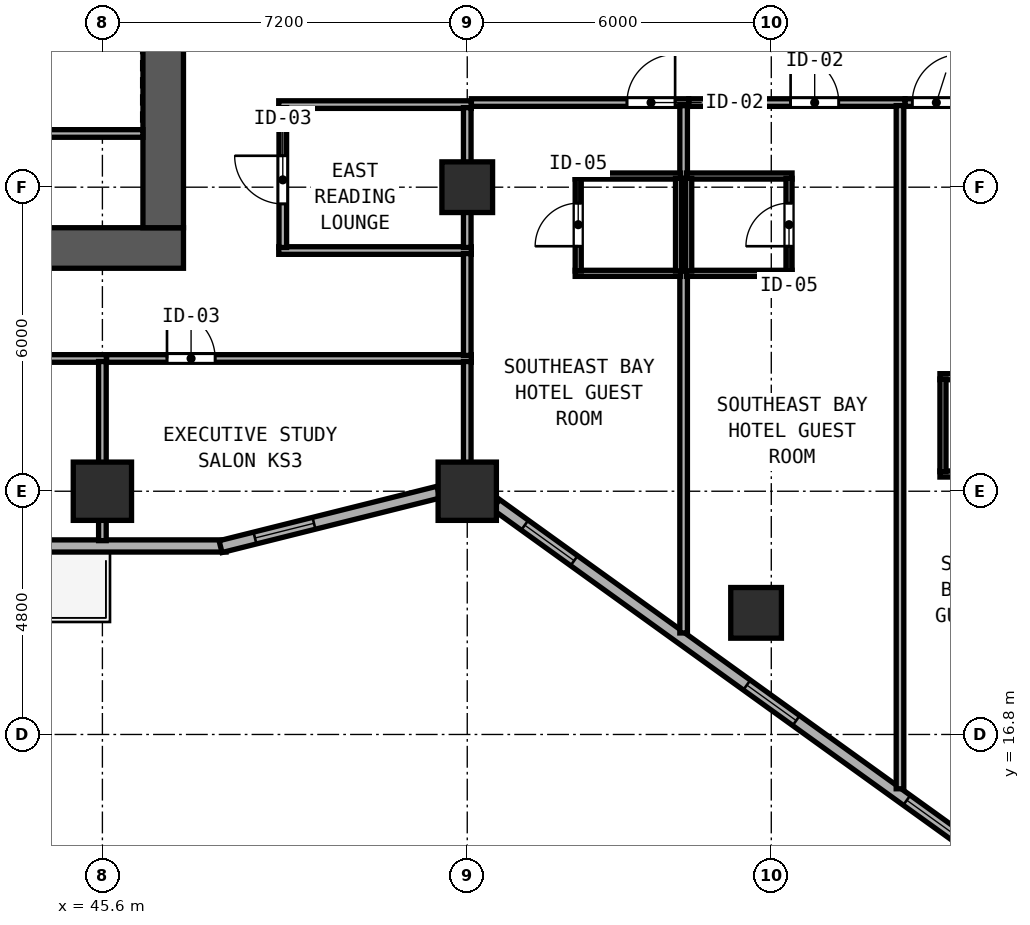
"""IFC4 building model, lengths in metres.
Left out: names, types, materials, properties, quantities, classifications, styles, units other than length and angle.
Written with IfcOpenShell. Run it as: python <this file> out.ifc"""

import sys

from ifc_helpers import new_model, si_unit, direction, frame, frame_2d, origin, origin_2d, place, context, subcontext, project, spatial, rectangle, hollow_rectangle, extrude, element, fill, save


model = new_model("IFC4")
c1 = context("Model", 3, precision=1e-05, world=origin(), true_north=direction((0.0, 1.0)))
c2 = subcontext(c1, "Body", "Model", "MODEL_VIEW")
j1 = project(units=[si_unit("LENGTHUNIT", "METRE"), si_unit("PLANEANGLEUNIT", "RADIAN")], contexts=[c1])
p1 = place(None, origin())
s1 = spatial("IfcSite", under=j1, at=p1, CompositionType="ELEMENT")
p2 = place(p1, origin())
s2 = spatial("IfcBuilding", under=s1, at=p2, CompositionType="ELEMENT")
p3 = place(p2, frame((0.0, 0.0, 59.0)))
s3 = spatial("IfcBuildingStorey", under=s2, at=p3, CompositionType="ELEMENT", Elevation=59.0)
p4 = place(p3, frame((29.6, 26.4, 0.0), z_axis=(0.0, 0.0, 1.0), x_axis=(1.0, 0.0, 0.0)))
e1 = element("IfcWall", 1, at=p4, inside=s3, PredefinedType="SHEAR", context=c2, shape_type="SweptSolid", body=[
    extrude(rectangle(XDim=17.6, YDim=0.8, at=frame_2d((8.8, 0.0))), origin(), (0.0, 0.0, 1.0), 3.6),
])
p5 = place(p4, frame((2.47, 0.0, 0.0), z_axis=(0.0, 0.0, 1.0), x_axis=(-1.0, 0.0, 0.0)))
e2 = element("IfcOpeningElement", 2, at=p5, cuts=e1, PredefinedType="OPENING", context=c2, shape_type="SweptSolid", body=[
    extrude(rectangle(XDim=0.9, YDim=2.1, at=frame_2d((0.45, 1.05))), frame((0.0, 0.41, 0.0), z_axis=(0.0, -1.0, 0.0), x_axis=(1.0, 0.0, 0.0)), (0.0, 0.0, 1.0), 0.82),
])
p6 = place(p4, frame((6.36, 0.0, 0.0), z_axis=(0.0, 0.0, 1.0), x_axis=(-1.0, 0.0, 0.0)))
e3 = element("IfcOpeningElement", 3, at=p6, cuts=e1, PredefinedType="OPENING", context=c2, shape_type="SweptSolid", body=[
    extrude(rectangle(XDim=0.9, YDim=2.1, at=frame_2d((0.45, 1.05))), frame((0.0, 0.41, 0.0), z_axis=(0.0, -1.0, 0.0), x_axis=(1.0, 0.0, 0.0)), (0.0, 0.0, 1.0), 0.82),
])
p7 = place(p3, frame((46.8, 26.8, 0.0), z_axis=(0.0, 0.0, 1.0), x_axis=(0.0, 1.0, 0.0)))
e4 = element("IfcWall", 4, at=p7, inside=s3, PredefinedType="SHEAR", context=c2, shape_type="SweptSolid", body=[
    extrude(rectangle(XDim=4.05, YDim=0.8, at=frame_2d((2.025, 0.0))), origin(), (0.0, 0.0, 1.0), 3.6),
])
for number, where, z_axis, x_axis in (
    (5, (52.8, 21.6, 0.0), (0.0, 0.0, 1.0), (1.0, 0.0, 0.0)),
    (6, (45.6, 21.6, 0.0), (0.0, 0.0, 1.0), (1.0, 0.0, 0.0)),
):
    element("IfcColumn", number, at=place(p3, frame(where, z_axis=z_axis, x_axis=x_axis)), inside=s3, PredefinedType="COLUMN", context=c2, shape_type="SweptSolid", body=[
        extrude(hollow_rectangle(XDim=1.15, YDim=1.15, WallThickness=0.042, at=origin_2d()), origin(), (0.0, 0.0, 1.0), 3.8),
    ])
for number, where, z_axis, x_axis in (
    (7, (52.8, 27.6, 0.0), (0.0, 0.0, 1.0), (1.0, 0.0, 0.0)),
    (8, (58.5, 19.2, 0.0), (0.0, 0.0, 1.0), (1.0, 0.0, 0.0)),
):
    element("IfcColumn", number, at=place(p3, frame(where, z_axis=z_axis, x_axis=x_axis)), inside=s3, PredefinedType="COLUMN", context=c2, shape_type="SweptSolid", body=[
        extrude(hollow_rectangle(XDim=1.0, YDim=1.0, WallThickness=0.038, at=origin_2d()), origin(), (0.0, 0.0, 1.0), 3.8),
    ])
p8 = place(p3, frame((28.76, 20.52, 0.0), z_axis=(0.0, 0.0, 1.0), x_axis=(1.0, 0.0, 0.0)))
e9 = element("IfcWall", 9, at=p8, inside=s3, PredefinedType="SOLIDWALL", context=c2, shape_type="SweptSolid", body=[
    extrude(rectangle(XDim=19.281, YDim=0.24, at=frame_2d((9.64, 0.0))), origin(), (0.0, 0.0, 1.0), 3.6),
])
p9 = place(p8, frame((15.64, 0.0, 0.0), z_axis=(0.0, 0.0, 1.0), x_axis=(-1.0, 0.0, 0.0)))
e10 = element("IfcOpeningElement", 10, at=p9, cuts=e9, PredefinedType="OPENING", context=c2, shape_type="SweptSolid", body=[
    extrude(rectangle(XDim=1.2, YDim=2.15, at=frame_2d((0.6, 1.075))), frame((0.0, 0.13, 0.0), z_axis=(0.0, -1.0, 0.0), x_axis=(1.0, 0.0, 0.0)), (0.0, 0.0, 1.0), 0.26),
])
p10 = place(p3, frame((47.932, 20.507, 0.0), z_axis=(0.0, 0.0, 1.0), x_axis=(0.970145739396, 0.242522667667, 0.0)))
e11 = element("IfcWall", 11, at=p10, inside=s3, PredefinedType="SOLIDWALL", context=c2, shape_type="SweptSolid", body=[
    extrude(rectangle(XDim=4.433, YDim=0.24, at=frame_2d((2.217, 0.0))), origin(), (0.0, 0.0, 1.0), 3.097),
])
p11 = place(p10, frame((0.7, 0.0, 0.85)))
e12 = element("IfcOpeningElement", 12, at=p11, cuts=e11, PredefinedType="OPENING", context=c2, shape_type="SweptSolid", body=[
    extrude(rectangle(XDim=1.2, YDim=1.85, at=frame_2d((0.6, 0.925))), frame((0.0, 0.13, 0.0), z_axis=(0.0, -1.0, 0.0), x_axis=(1.0, 0.0, 0.0)), (0.0, 0.0, 1.0), 0.26),
])
p12 = place(p3, frame((53.367, 21.34, 0.0), z_axis=(0.0, 0.0, 1.0), x_axis=(0.811543176492, -0.58429245476, 0.0)))
e13 = element("IfcWall", 13, at=p12, inside=s3, PredefinedType="SOLIDWALL", context=c2, shape_type="SweptSolid", body=[
    extrude(rectangle(XDim=11.531, YDim=0.24, at=frame_2d((5.765, 0.0))), origin(), (0.0, 0.0, 1.0), 3.097),
])
p13 = place(p12, frame((0.7, 0.0, 0.85)))
e14 = element("IfcOpeningElement", 14, at=p13, cuts=e13, PredefinedType="OPENING", context=c2, shape_type="SweptSolid", body=[
    extrude(rectangle(XDim=1.2, YDim=1.85, at=frame_2d((0.6, 0.925))), frame((0.0, 0.13, 0.0), z_axis=(0.0, -1.0, 0.0), x_axis=(1.0, 0.0, 0.0)), (0.0, 0.0, 1.0), 0.26),
])
p14 = place(p12, frame((6.1, 0.0, 0.85)))
e15 = element("IfcOpeningElement", 15, at=p14, cuts=e13, PredefinedType="OPENING", context=c2, shape_type="SweptSolid", body=[
    extrude(rectangle(XDim=1.2, YDim=1.85, at=frame_2d((0.6, 0.925))), frame((0.0, 0.13, 0.0), z_axis=(0.0, -1.0, 0.0), x_axis=(1.0, 0.0, 0.0)), (0.0, 0.0, 1.0), 0.26),
])
p15 = place(p12, frame((9.99, 0.0, 0.85)))
e16 = element("IfcOpeningElement", 16, at=p15, cuts=e13, PredefinedType="OPENING", context=c2, shape_type="SweptSolid", body=[
    extrude(rectangle(XDim=1.2, YDim=1.85, at=frame_2d((0.6, 0.925))), frame((0.0, 0.13, 0.0), z_axis=(0.0, -1.0, 0.0), x_axis=(1.0, 0.0, 0.0)), (0.0, 0.0, 1.0), 0.26),
])
p16 = place(p3, frame((30.4, 28.66, 0.0), z_axis=(0.0, 0.0, 1.0), x_axis=(1.0, 0.0, 0.0)))
e17 = element("IfcWall", 17, at=p16, inside=s3, PredefinedType="PARTITIONING", context=c2, shape_type="SweptSolid", body=[
    extrude(rectangle(XDim=16.0, YDim=0.15, at=frame_2d((8.0, 0.0))), origin(), (0.0, 0.0, 1.0), 3.6),
])
for number, where, z_axis, x_axis in (
    (18, (49.08, 29.23, 0.0), (0.0, 0.0, 1.0), (1.0, 0.0, 0.0)),
    (19, (49.08, 26.35, 0.0), (0.0, 0.0, 1.0), (1.0, 0.0, 0.0)),
):
    element("IfcWall", number, at=place(p3, frame(where, z_axis=z_axis, x_axis=x_axis)), inside=s3, PredefinedType="PARTITIONING", context=c2, shape_type="SweptSolid", body=[
        extrude(rectangle(XDim=3.8, YDim=0.15, at=frame_2d((1.9, 0.0))), origin(), (0.0, 0.0, 1.0), 3.6),
    ])
p17 = place(p3, frame((49.16, 26.41, 0.0), z_axis=(0.0, 0.0, 1.0), x_axis=(0.0, 1.0, 0.0)))
e20 = element("IfcWall", 20, at=p17, inside=s3, PredefinedType="PARTITIONING", context=c2, shape_type="SweptSolid", body=[
    extrude(rectangle(XDim=2.76, YDim=0.15, at=frame_2d((1.38, 0.0))), origin(), (0.0, 0.0, 1.0), 3.6),
])
p18 = place(p17, frame((0.86, 0.0, 0.0)))
e21 = element("IfcOpeningElement", 21, at=p18, cuts=e20, PredefinedType="OPENING", context=c2, shape_type="SweptSolid", body=[
    extrude(rectangle(XDim=0.95, YDim=2.12, at=frame_2d((0.475, 1.06))), frame((0.0, 0.085, 0.0), z_axis=(0.0, -1.0, 0.0), x_axis=(1.0, 0.0, 0.0)), (0.0, 0.0, 1.0), 0.17),
])
p19 = place(p3, frame((52.8, 26.41, 0.0), z_axis=(0.0, 0.0, 1.0), x_axis=(0.0, 1.0, 0.0)))
e22 = element("IfcWall", 22, at=p19, inside=s3, PredefinedType="PARTITIONING", context=c2, shape_type="SweptSolid", body=[
    extrude(rectangle(XDim=2.76, YDim=0.15, at=frame_2d((1.38, 0.0))), origin(), (0.0, 0.0, 1.0), 3.097),
])
p20 = place(p3, frame((38.482, 24.22, 0.0), z_axis=(0.0, 0.0, 1.0), x_axis=(1.0, 0.0, 0.0)))
e23 = element("IfcWall", 23, at=p20, inside=s3, PredefinedType="PARTITIONING", context=c2, shape_type="SweptSolid", body=[
    extrude(rectangle(XDim=7.198, YDim=0.15, at=frame_2d((3.599, 0.0))), origin(), (0.0, 0.0, 1.0), 3.6),
])
p21 = place(p20, frame((3.913, 0.0, 0.0), z_axis=(0.0, 0.0, 1.0), x_axis=(-1.0, 0.0, 0.0)))
e24 = element("IfcOpeningElement", 24, at=p21, cuts=e23, PredefinedType="OPENING", context=c2, shape_type="SweptSolid", body=[
    extrude(rectangle(XDim=0.95, YDim=2.12, at=frame_2d((0.475, 1.06))), frame((0.0, 0.085, 0.0), z_axis=(0.0, -1.0, 0.0), x_axis=(1.0, 0.0, 0.0)), (0.0, 0.0, 1.0), 0.17),
])
p22 = place(p3, frame((45.6, 20.625, 0.0), z_axis=(0.0, 0.0, 1.0), x_axis=(0.0, 1.0, 0.0)))
e25 = element("IfcWall", 25, at=p22, inside=s3, PredefinedType="PARTITIONING", context=c2, shape_type="SweptSolid", body=[
    extrude(rectangle(XDim=3.535, YDim=0.15, at=frame_2d((1.768, 0.0))), origin(), (0.0, 0.0, 1.0), 2.985),
])
p23 = place(p3, frame((45.682, 24.22, 0.0), z_axis=(0.0, 0.0, 1.0), x_axis=(1.0, 0.0, 0.0)))
e26 = element("IfcWall", 26, at=p23, inside=s3, PredefinedType="PARTITIONING", context=c2, shape_type="SweptSolid", body=[
    extrude(rectangle(XDim=7.198, YDim=0.15, at=frame_2d((3.599, 0.0))), origin(), (0.0, 0.0, 1.0), 3.6),
])
p24 = place(p23, frame((2.143, 0.0, 0.0), z_axis=(0.0, 0.0, 1.0), x_axis=(-1.0, 0.0, 0.0)))
e27 = element("IfcOpeningElement", 27, at=p24, cuts=e26, PredefinedType="OPENING", context=c2, shape_type="SweptSolid", body=[
    extrude(rectangle(XDim=0.95, YDim=2.12, at=frame_2d((0.475, 1.06))), frame((0.0, 0.085, 0.0), z_axis=(0.0, -1.0, 0.0), x_axis=(1.0, 0.0, 0.0)), (0.0, 0.0, 1.0), 0.17),
])
p25 = place(p3, frame((52.8, 21.819, 0.0), z_axis=(0.0, 0.0, 1.0), x_axis=(0.0, 1.0, 0.0)))
e28 = element("IfcWall", 28, at=p25, inside=s3, PredefinedType="PARTITIONING", context=c2, shape_type="SweptSolid", body=[
    extrude(rectangle(XDim=2.341, YDim=0.15, at=frame_2d((1.171, 0.0))), origin(), (0.0, 0.0, 1.0), 3.097),
])
p26 = place(p3, frame((52.882, 29.27, 0.0), z_axis=(0.0, 0.0, 1.0), x_axis=(1.0, 0.0, 0.0)))
e29 = element("IfcWall", 29, at=p26, inside=s3, PredefinedType="PARTITIONING", context=c2, shape_type="SweptSolid", body=[
    extrude(rectangle(XDim=4.288, YDim=0.15, at=frame_2d((2.144, 0.0))), origin(), (0.0, 0.0, 1.0), 3.6),
])
p27 = place(p26, frame((4.02, 0.0, 0.0), z_axis=(0.0, 0.0, 1.0), x_axis=(-1.0, 0.0, 0.0)))
e30 = element("IfcOpeningElement", 30, at=p27, cuts=e29, PredefinedType="OPENING", context=c2, shape_type="SweptSolid", body=[
    extrude(rectangle(XDim=0.95, YDim=2.15, at=frame_2d((0.475, 1.075))), frame((0.0, 0.085, 0.0), z_axis=(0.0, -1.0, 0.0), x_axis=(1.0, 0.0, 0.0)), (0.0, 0.0, 1.0), 0.17),
])
p28 = place(p3, frame((52.8, 24.28, 0.0), z_axis=(0.0, 0.0, 1.0), x_axis=(0.0, 1.0, 0.0)))
e31 = element("IfcWall", 31, at=p28, inside=s3, PredefinedType="PARTITIONING", context=c2, shape_type="SweptSolid", body=[
    extrude(rectangle(XDim=2.01, YDim=0.15, at=frame_2d((1.005, 0.0))), origin(), (0.0, 0.0, 1.0), 3.097),
])
p29 = place(p3, frame((57.07, 18.803, 0.0), z_axis=(0.0, 0.0, 1.0), x_axis=(0.0, 1.0, 0.0)))
e32 = element("IfcWall", 32, at=p29, inside=s3, PredefinedType="PARTITIONING", context=c2, shape_type="SweptSolid", body=[
    extrude(rectangle(XDim=10.407, YDim=0.15, at=frame_2d((5.204, 0.0))), origin(), (0.0, 0.0, 1.0), 3.6),
])
p30 = place(p3, frame((54.93, 27.82, 0.0), z_axis=(0.0, 0.0, 1.0), x_axis=(1.0, 0.0, 0.0)))
e33 = element("IfcWall", 33, at=p30, inside=s3, PredefinedType="PARTITIONING", context=c2, shape_type="SweptSolid", body=[
    extrude(rectangle(XDim=2.08, YDim=0.12, at=frame_2d((1.04, 0.0))), origin(), (0.0, 0.0, 1.0), 3.097),
])
p31 = place(p3, frame((54.93, 25.9, 0.0), z_axis=(0.0, 0.0, 1.0), x_axis=(1.0, 0.0, 0.0)))
e34 = element("IfcWall", 34, at=p31, inside=s3, PredefinedType="PARTITIONING", context=c2, shape_type="SweptSolid", body=[
    extrude(rectangle(XDim=2.08, YDim=0.12, at=frame_2d((1.04, 0.0))), origin(), (0.0, 0.0, 1.0), 3.6),
])
p32 = place(p3, frame((54.99, 25.945, 0.0), z_axis=(0.0, 0.0, 1.0), x_axis=(0.0, 1.0, 0.0)))
e35 = element("IfcWall", 35, at=p32, inside=s3, PredefinedType="PARTITIONING", context=c2, shape_type="SweptSolid", body=[
    extrude(rectangle(XDim=1.83, YDim=0.12, at=frame_2d((0.915, 0.0))), origin(), (0.0, 0.0, 1.0), 3.6),
])
p33 = place(p32, frame((1.34, 0.0, 0.0), z_axis=(0.0, 0.0, 1.0), x_axis=(-1.0, 0.0, 0.0)))
e36 = element("IfcOpeningElement", 36, at=p33, cuts=e35, PredefinedType="OPENING", context=c2, shape_type="SweptSolid", body=[
    extrude(rectangle(XDim=0.85, YDim=2.1, at=frame_2d((0.425, 1.05))), frame((0.0, 0.07, 0.0), z_axis=(0.0, -1.0, 0.0), x_axis=(1.0, 0.0, 0.0)), (0.0, 0.0, 1.0), 0.14),
])
p34 = place(p3, frame((56.97, 25.945, 0.0), z_axis=(0.0, 0.0, 1.0), x_axis=(0.0, 1.0, 0.0)))
e37 = element("IfcWall", 37, at=p34, inside=s3, PredefinedType="PARTITIONING", context=c2, shape_type="SweptSolid", body=[
    extrude(rectangle(XDim=1.83, YDim=0.12, at=frame_2d((0.915, 0.0))), origin(), (0.0, 0.0, 1.0), 3.6),
])
p35 = place(p3, frame((57.172, 29.27, 0.0), z_axis=(0.0, 0.0, 1.0), x_axis=(1.0, 0.0, 0.0)))
e38 = element("IfcWall", 38, at=p35, inside=s3, PredefinedType="PARTITIONING", context=c2, shape_type="SweptSolid", body=[
    extrude(rectangle(XDim=4.268, YDim=0.15, at=frame_2d((2.134, 0.0))), origin(), (0.0, 0.0, 1.0), 3.6),
])
p36 = place(p35, frame((2.959, 0.0, 0.0), z_axis=(0.0, 0.0, 1.0), x_axis=(-1.0, 0.0, 0.0)))
e39 = element("IfcOpeningElement", 39, at=p36, cuts=e38, PredefinedType="OPENING", context=c2, shape_type="SweptSolid", body=[
    extrude(rectangle(XDim=0.95, YDim=2.15, at=frame_2d((0.475, 1.075))), frame((0.0, 0.085, 0.0), z_axis=(0.0, -1.0, 0.0), x_axis=(1.0, 0.0, 0.0)), (0.0, 0.0, 1.0), 0.17),
])
p37 = place(p3, frame((61.34, 15.729, 0.0), z_axis=(0.0, 0.0, 1.0), x_axis=(0.0, 1.0, 0.0)))
e40 = element("IfcWall", 40, at=p37, inside=s3, PredefinedType="PARTITIONING", context=c2, shape_type="SweptSolid", body=[
    extrude(rectangle(XDim=13.481, YDim=0.15, at=frame_2d((6.741, 0.0))), origin(), (0.0, 0.0, 1.0), 3.6),
])
p38 = place(p3, frame((57.13, 27.82, 0.0), z_axis=(0.0, 0.0, 1.0), x_axis=(1.0, 0.0, 0.0)))
e41 = element("IfcWall", 41, at=p38, inside=s3, PredefinedType="PARTITIONING", context=c2, shape_type="SweptSolid", body=[
    extrude(rectangle(XDim=2.08, YDim=0.12, at=frame_2d((1.04, 0.0))), origin(), (0.0, 0.0, 1.0), 3.097),
])
p39 = place(p3, frame((57.13, 25.9, 0.0), z_axis=(0.0, 0.0, 1.0), x_axis=(1.0, 0.0, 0.0)))
e42 = element("IfcWall", 42, at=p39, inside=s3, PredefinedType="PARTITIONING", context=c2, shape_type="SweptSolid", body=[
    extrude(rectangle(XDim=2.08, YDim=0.12, at=frame_2d((1.04, 0.0))), origin(), (0.0, 0.0, 1.0), 3.6),
])
p40 = place(p3, frame((57.17, 25.945, 0.0), z_axis=(0.0, 0.0, 1.0), x_axis=(0.0, 1.0, 0.0)))
e43 = element("IfcWall", 43, at=p40, inside=s3, PredefinedType="PARTITIONING", context=c2, shape_type="SweptSolid", body=[
    extrude(rectangle(XDim=1.83, YDim=0.12, at=frame_2d((0.915, 0.0))), origin(), (0.0, 0.0, 1.0), 3.6),
])
p41 = place(p3, frame((59.15, 25.945, 0.0), z_axis=(0.0, 0.0, 1.0), x_axis=(0.0, 1.0, 0.0)))
e44 = element("IfcWall", 44, at=p41, inside=s3, PredefinedType="PARTITIONING", context=c2, shape_type="SweptSolid", body=[
    extrude(rectangle(XDim=1.83, YDim=0.12, at=frame_2d((0.915, 0.0))), origin(), (0.0, 0.0, 1.0), 3.6),
])
p42 = place(p41, frame((0.49, 0.0, 0.0)))
e45 = element("IfcOpeningElement", 45, at=p42, cuts=e44, PredefinedType="OPENING", context=c2, shape_type="SweptSolid", body=[
    extrude(rectangle(XDim=0.85, YDim=2.1, at=frame_2d((0.425, 1.05))), frame((0.0, 0.07, 0.0), z_axis=(0.0, -1.0, 0.0), x_axis=(1.0, 0.0, 0.0)), (0.0, 0.0, 1.0), 0.14),
])
p43 = place(p3, frame((61.442, 29.27, 0.0), z_axis=(0.0, 0.0, 1.0), x_axis=(1.0, 0.0, 0.0)))
e46 = element("IfcWall", 46, at=p43, inside=s3, PredefinedType="PARTITIONING", context=c2, shape_type="SweptSolid", body=[
    extrude(rectangle(XDim=3.658, YDim=0.15, at=frame_2d((1.829, 0.0))), origin(), (0.0, 0.0, 1.0), 3.6),
])
p44 = place(p43, frame((1.09, 0.0, 0.0), z_axis=(0.0, 0.0, 1.0), x_axis=(-1.0, 0.0, 0.0)))
e47 = element("IfcOpeningElement", 47, at=p44, cuts=e46, PredefinedType="OPENING", context=c2, shape_type="SweptSolid", body=[
    extrude(rectangle(XDim=0.95, YDim=2.15, at=frame_2d((0.475, 1.075))), frame((0.0, 0.085, 0.0), z_axis=(0.0, -1.0, 0.0), x_axis=(1.0, 0.0, 0.0)), (0.0, 0.0, 1.0), 0.17),
])
p45 = place(p3, frame((62.128, 23.86, 0.0), z_axis=(0.0, 0.0, 1.0), x_axis=(1.0, 0.0, 0.0)))
e48 = element("IfcWall", 48, at=p45, inside=s3, PredefinedType="PARTITIONING", context=c2, shape_type="SweptSolid", body=[
    extrude(rectangle(XDim=2.1, YDim=0.12, at=frame_2d((1.05, 0.0))), origin(), (0.0, 0.0, 1.0), 3.6),
])
p46 = place(p45, frame((1.475, 0.0, 0.0), z_axis=(0.0, 0.0, 1.0), x_axis=(-1.0, 0.0, 0.0)))
e49 = element("IfcOpeningElement", 49, at=p46, cuts=e48, PredefinedType="OPENING", context=c2, shape_type="SweptSolid", body=[
    extrude(rectangle(XDim=0.85, YDim=2.1, at=frame_2d((0.425, 1.05))), frame((0.0, 0.07, 0.0), z_axis=(0.0, -1.0, 0.0), x_axis=(1.0, 0.0, 0.0)), (0.0, 0.0, 1.0), 0.14),
])
p47 = place(p3, frame((62.128, 21.94, 0.0), z_axis=(0.0, 0.0, 1.0), x_axis=(1.0, 0.0, 0.0)))
e50 = element("IfcWall", 50, at=p47, inside=s3, PredefinedType="PARTITIONING", context=c2, shape_type="SweptSolid", body=[
    extrude(rectangle(XDim=2.1, YDim=0.12, at=frame_2d((1.05, 0.0))), origin(), (0.0, 0.0, 1.0), 3.6),
])
p48 = place(p3, frame((62.188, 21.985, 0.0), z_axis=(0.0, 0.0, 1.0), x_axis=(0.0, 1.0, 0.0)))
e51 = element("IfcWall", 51, at=p48, inside=s3, PredefinedType="PARTITIONING", context=c2, shape_type="SweptSolid", body=[
    extrude(rectangle(XDim=1.83, YDim=0.12, at=frame_2d((0.915, 0.0))), origin(), (0.0, 0.0, 1.0), 3.6),
])
p49 = place(p11, origin())
e52 = element("IfcWindow", 52, at=p49, inside=s3, PartitioningType="SINGLE_PANEL", PredefinedType="WINDOW", context=c2, shape_type="SweptSolid", body=[
    extrude(rectangle(XDim=1.2, YDim=1.85, at=frame_2d((0.6, 0.925))), frame((0.0, 0.03, 0.0), z_axis=(0.0, -1.0, 0.0), x_axis=(1.0, 0.0, 0.0)), (0.0, 0.0, 1.0), 0.06),
])
fill(e12, e52)
p50 = place(p13, origin())
e53 = element("IfcWindow", 53, at=p50, inside=s3, PartitioningType="SINGLE_PANEL", PredefinedType="WINDOW", context=c2, shape_type="SweptSolid", body=[
    extrude(rectangle(XDim=1.2, YDim=1.85, at=frame_2d((0.6, 0.925))), frame((0.0, 0.03, 0.0), z_axis=(0.0, -1.0, 0.0), x_axis=(1.0, 0.0, 0.0)), (0.0, 0.0, 1.0), 0.06),
])
fill(e14, e53)
p51 = place(p14, origin())
e54 = element("IfcWindow", 54, at=p51, inside=s3, PartitioningType="SINGLE_PANEL", PredefinedType="WINDOW", context=c2, shape_type="SweptSolid", body=[
    extrude(rectangle(XDim=1.2, YDim=1.85, at=frame_2d((0.6, 0.925))), frame((0.0, 0.03, 0.0), z_axis=(0.0, -1.0, 0.0), x_axis=(1.0, 0.0, 0.0)), (0.0, 0.0, 1.0), 0.06),
])
fill(e15, e54)
p52 = place(p18, origin())
e55 = element("IfcDoor", 55, at=p52, inside=s3, OperationType="SINGLE_SWING_RIGHT", PredefinedType="DOOR", context=c2, shape_type="SweptSolid", body=[
    extrude(rectangle(XDim=0.95, YDim=2.12, at=frame_2d((0.475, 1.06))), frame((0.0, 0.025, 0.0), z_axis=(0.0, -1.0, 0.0), x_axis=(1.0, 0.0, 0.0)), (0.0, 0.0, 1.0), 0.05),
])
fill(e21, e55)
p53 = place(p24, origin())
e56 = element("IfcDoor", 56, at=p53, inside=s3, OperationType="SINGLE_SWING_RIGHT", PredefinedType="DOOR", context=c2, shape_type="SweptSolid", body=[
    extrude(rectangle(XDim=0.95, YDim=2.12, at=frame_2d((0.475, 1.06))), frame((0.0, 0.025, 0.0), z_axis=(0.0, -1.0, 0.0), x_axis=(1.0, 0.0, 0.0)), (0.0, 0.0, 1.0), 0.05),
])
fill(e27, e56)
p54 = place(p27, origin())
e57 = element("IfcDoor", 57, at=p54, inside=s3, OperationType="SINGLE_SWING_LEFT", PredefinedType="DOOR", context=c2, shape_type="SweptSolid", body=[
    extrude(rectangle(XDim=0.95, YDim=2.15, at=frame_2d((0.475, 1.075))), frame((0.0, 0.025, 0.0), z_axis=(0.0, -1.0, 0.0), x_axis=(1.0, 0.0, 0.0)), (0.0, 0.0, 1.0), 0.05),
])
fill(e30, e57)
p55 = place(p33, origin())
e58 = element("IfcDoor", 58, at=p55, inside=s3, OperationType="SINGLE_SWING_RIGHT", PredefinedType="DOOR", context=c2, shape_type="SweptSolid", body=[
    extrude(rectangle(XDim=0.85, YDim=2.1, at=frame_2d((0.425, 1.05))), frame((0.0, 0.025, 0.0), z_axis=(0.0, -1.0, 0.0), x_axis=(1.0, 0.0, 0.0)), (0.0, 0.0, 1.0), 0.05),
])
fill(e36, e58)
p56 = place(p36, origin())
e59 = element("IfcDoor", 59, at=p56, inside=s3, OperationType="SINGLE_SWING_RIGHT", PredefinedType="DOOR", context=c2, shape_type="SweptSolid", body=[
    extrude(rectangle(XDim=0.95, YDim=2.15, at=frame_2d((0.475, 1.075))), frame((0.0, 0.025, 0.0), z_axis=(0.0, -1.0, 0.0), x_axis=(1.0, 0.0, 0.0)), (0.0, 0.0, 1.0), 0.05),
])
fill(e39, e59)
p57 = place(p42, origin())
e60 = element("IfcDoor", 60, at=p57, inside=s3, OperationType="SINGLE_SWING_LEFT", PredefinedType="DOOR", context=c2, shape_type="SweptSolid", body=[
    extrude(rectangle(XDim=0.85, YDim=2.1, at=frame_2d((0.425, 1.05))), frame((0.0, 0.025, 0.0), z_axis=(0.0, -1.0, 0.0), x_axis=(1.0, 0.0, 0.0)), (0.0, 0.0, 1.0), 0.05),
])
fill(e45, e60)
p58 = place(p44, origin())
e61 = element("IfcDoor", 61, at=p58, inside=s3, OperationType="SINGLE_SWING_LEFT", PredefinedType="DOOR", context=c2, shape_type="SweptSolid", body=[
    extrude(rectangle(XDim=0.95, YDim=2.15, at=frame_2d((0.475, 1.075))), frame((0.0, 0.025, 0.0), z_axis=(0.0, -1.0, 0.0), x_axis=(1.0, 0.0, 0.0)), (0.0, 0.0, 1.0), 0.05),
])
fill(e47, e61)
p59 = place(p15, origin())
e62 = element("IfcWindow", 62, at=p59, inside=s3, PartitioningType="SINGLE_PANEL", PredefinedType="WINDOW", context=c2, shape_type="SweptSolid", body=[
    extrude(rectangle(XDim=1.2, YDim=1.85, at=frame_2d((0.6, 0.925))), frame((0.0, 0.03, 0.0), z_axis=(0.0, -1.0, 0.0), x_axis=(1.0, 0.0, 0.0)), (0.0, 0.0, 1.0), 0.06),
])
fill(e16, e62)
save(model, sys.argv[1])
